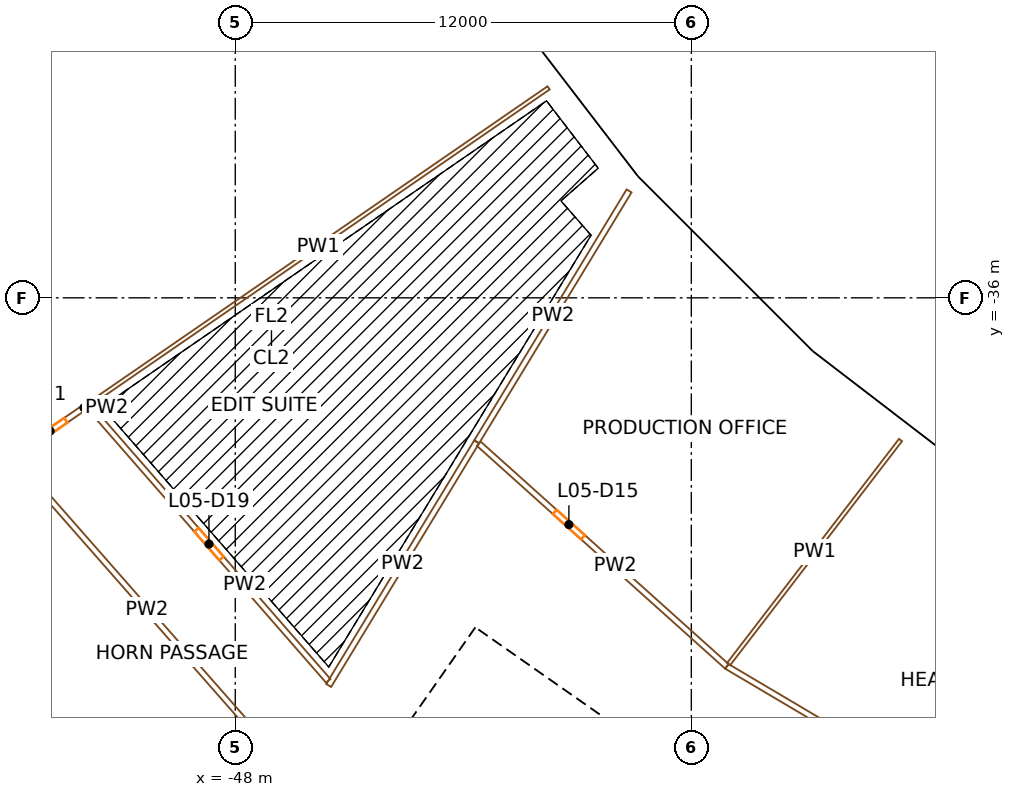
"""IFC4 building model, lengths in metres.
Left out: names, types, materials, properties, quantities, classifications, styles, units other than length and angle.
Written with IfcOpenShell. Run it as: python <this file> out.ifc"""

import sys

from ifc_helpers import new_model, si_unit, direction, frame, frame_2d, origin, origin_2d, place, context, subcontext, project, spatial, rectangle, extrude, element, fill, save


model = new_model("IFC4")
c1 = context("Model", 3, precision=1e-05, world=origin(), true_north=direction((0.0, 1.0)))
c2 = subcontext(c1, "Body", "Model", "MODEL_VIEW")
j1 = project(units=[si_unit("LENGTHUNIT", "METRE"), si_unit("PLANEANGLEUNIT", "RADIAN")], contexts=[c1])
p1 = place(None, origin())
s1 = spatial("IfcSite", under=j1, at=p1, CompositionType="ELEMENT")
p2 = place(p1, origin())
s2 = spatial("IfcBuilding", under=s1, at=p2, CompositionType="ELEMENT")
p3 = place(p2, frame((0.0, 0.0, 36.0)))
s3 = spatial("IfcBuildingStorey", under=s2, at=p3, CompositionType="ELEMENT", Elevation=36.0)
p4 = place(p3, frame((-48.433, -32.362, 0.0), z_axis=(0.0, 0.0, 1.0), x_axis=(0.55557023302, -0.831469612303, 0.0)))
e1 = element("IfcColumn", 1, at=p4, inside=s3, PredefinedType="COLUMN", context=c2, shape_type="SweptSolid", body=[
    extrude(rectangle(XDim=1.4, YDim=1.8, at=origin_2d()), origin(), (0.0, 0.0, 1.0), 4.5),
])
p5 = place(p3, frame((-38.156, -33.462, 0.0), z_axis=(0.0, 0.0, 1.0), x_axis=(0.6593458151, -0.751839807479, 0.0)))
e2 = element("IfcColumn", 2, at=p5, inside=s3, PredefinedType="COLUMN", context=c2, shape_type="SweptSolid", body=[
    extrude(rectangle(XDim=1.1, YDim=1.3, at=origin_2d()), origin(), (0.0, 0.0, 1.0), 4.5),
])
p6 = place(p3, frame((-43.795, -38.407, 0.0), z_axis=(0.0, 0.0, 1.0), x_axis=(0.6593458151, -0.751839807479, 0.0)))
e3 = element("IfcColumn", 3, at=p6, inside=s3, PredefinedType="COLUMN", context=c2, shape_type="SweptSolid", body=[
    extrude(rectangle(XDim=1.4, YDim=1.8, at=origin_2d()), origin(), (0.0, 0.0, 1.0), 4.5),
])
p7 = place(p3, frame((-33.462, -38.156, 0.0), z_axis=(0.0, 0.0, 1.0), x_axis=(0.751839807479, -0.6593458151, 0.0)))
e4 = element("IfcColumn", 4, at=p7, inside=s3, PredefinedType="COLUMN", context=c2, shape_type="SweptSolid", body=[
    extrude(rectangle(XDim=1.1, YDim=1.3, at=origin_2d()), origin(), (0.0, 0.0, 1.0), 4.5),
])
p8 = place(p3, frame((-38.407, -43.795, 0.0), z_axis=(0.0, 0.0, 1.0), x_axis=(0.751839807479, -0.6593458151, 0.0)))
e5 = element("IfcColumn", 5, at=p8, inside=s3, PredefinedType="COLUMN", context=c2, shape_type="SweptSolid", body=[
    extrude(rectangle(XDim=1.4, YDim=1.8, at=origin_2d()), origin(), (0.0, 0.0, 1.0), 4.5),
])
p9 = place(p3, frame((-49.779, -57.191, 0.0), z_axis=(0.0, 0.0, 1.0), x_axis=(0.573577477574, 0.819151315216, 0.0)))
e6 = element("IfcWall", 6, at=p9, inside=s3, PredefinedType="SHEAR", context=c2, shape_type="SweptSolid", body=[
    extrude(rectangle(XDim=14.8, YDim=0.9, at=frame_2d((7.4, 0.0))), origin(), (0.0, 0.0, 1.0), 4.2),
])
p10 = place(p9, frame((6.7, 0.0, 0.0)))
e7 = element("IfcOpeningElement", 7, at=p10, cuts=e6, PredefinedType="OPENING", context=c2, shape_type="SweptSolid", body=[
    extrude(rectangle(XDim=1.4, YDim=2.1, at=frame_2d((0.7, 1.05))), frame((0.0, 0.46, 0.0), z_axis=(0.0, -1.0, 0.0), x_axis=(1.0, 0.0, 0.0)), (0.0, 0.0, 1.0), 0.92),
])
p11 = place(p3, frame((-28.854, -54.324, 0.0), z_axis=(0.0, 0.0, 1.0), x_axis=(-0.819145767589, 0.573585400304, 0.0)))
e8 = element("IfcWall", 8, at=p11, inside=s3, PredefinedType="SHEAR", context=c2, shape_type="SweptSolid", body=[
    extrude(rectangle(XDim=15.045, YDim=0.9, at=frame_2d((7.523, 0.0))), origin(), (0.0, 0.0, 1.0), 4.2),
])
p12 = place(p11, frame((1.05, 0.0, 0.0)))
e9 = element("IfcOpeningElement", 9, at=p12, cuts=e8, PredefinedType="OPENING", context=c2, shape_type="SweptSolid", body=[
    extrude(rectangle(XDim=0.9, YDim=2.1, at=frame_2d((0.45, 1.05))), frame((0.0, 0.46, 0.0), z_axis=(0.0, -1.0, 0.0), x_axis=(1.0, 0.0, 0.0)), (0.0, 0.0, 1.0), 0.92),
])
p13 = place(p11, frame((3.775, 0.0, 0.0)))
e10 = element("IfcOpeningElement", 10, at=p13, cuts=e8, PredefinedType="OPENING", context=c2, shape_type="SweptSolid", body=[
    extrude(rectangle(XDim=1.0, YDim=2.1, at=frame_2d((0.5, 1.05))), frame((0.0, 0.46, 0.0), z_axis=(0.0, -1.0, 0.0), x_axis=(1.0, 0.0, 0.0)), (0.0, 0.0, 1.0), 0.92),
])
p14 = place(p11, frame((6.275, 0.0, 0.0)))
e11 = element("IfcOpeningElement", 11, at=p14, cuts=e8, PredefinedType="OPENING", context=c2, shape_type="SweptSolid", body=[
    extrude(rectangle(XDim=1.0, YDim=2.1, at=frame_2d((0.5, 1.05))), frame((0.0, 0.46, 0.0), z_axis=(0.0, -1.0, 0.0), x_axis=(1.0, 0.0, 0.0)), (0.0, 0.0, 1.0), 0.92),
])
p15 = place(p11, frame((13.495, 0.0, 0.0)))
e12 = element("IfcOpeningElement", 12, at=p15, cuts=e8, PredefinedType="OPENING", context=c2, shape_type="SweptSolid", body=[
    extrude(rectangle(XDim=1.1, YDim=2.1, at=frame_2d((0.55, 1.05))), frame((0.0, 0.46, 0.0), z_axis=(0.0, -1.0, 0.0), x_axis=(1.0, 0.0, 0.0)), (0.0, 0.0, 1.0), 0.92),
])
p16 = place(p3, frame((-37.555, -32.975, 0.0), z_axis=(0.0, 0.0, 1.0), x_axis=(-0.608780327927, 0.793338838284, 0.0)))
e13 = element("IfcWall", 13, at=p16, inside=s3, PredefinedType="SOLIDWALL", context=c2, shape_type="SweptSolid", body=[
    extrude(rectangle(XDim=6.597, YDim=0.45, at=frame_2d((3.298, 0.0))), origin(), (0.0, 0.0, 1.0), 3.2),
])
p17 = place(p16, frame((3.749, 0.0, 0.9)))
e14 = element("IfcOpeningElement", 14, at=p17, cuts=e13, PredefinedType="OPENING", context=c2, shape_type="SweptSolid", body=[
    extrude(rectangle(XDim=1.2, YDim=2.15, at=frame_2d((0.6, 1.075))), frame((0.0, 0.235, 0.0), z_axis=(0.0, -1.0, 0.0), x_axis=(1.0, 0.0, 0.0)), (0.0, 0.0, 1.0), 0.47),
])
p18 = place(p16, frame((1.648, 0.0, 0.9)))
e15 = element("IfcOpeningElement", 15, at=p18, cuts=e13, PredefinedType="OPENING", context=c2, shape_type="SweptSolid", body=[
    extrude(rectangle(XDim=1.2, YDim=2.15, at=frame_2d((0.6, 1.075))), frame((0.0, 0.235, 0.0), z_axis=(0.0, -1.0, 0.0), x_axis=(1.0, 0.0, 0.0)), (0.0, 0.0, 1.0), 0.47),
])
p19 = place(p3, frame((-32.993, -37.532, 0.0), z_axis=(0.0, 0.0, 1.0), x_axis=(-0.707106781187, 0.707106781187, 0.0)))
e16 = element("IfcWall", 16, at=p19, inside=s3, PredefinedType="SOLIDWALL", context=c2, shape_type="SweptSolid", body=[
    extrude(rectangle(XDim=6.419, YDim=0.45, at=frame_2d((3.209, 0.0))), origin(), (0.0, 0.0, 1.0), 3.2),
])
p20 = place(p19, frame((3.66, 0.0, 0.9)))
e17 = element("IfcOpeningElement", 17, at=p20, cuts=e16, PredefinedType="OPENING", context=c2, shape_type="SweptSolid", body=[
    extrude(rectangle(XDim=1.2, YDim=2.15, at=frame_2d((0.6, 1.075))), frame((0.0, 0.235, 0.0), z_axis=(0.0, -1.0, 0.0), x_axis=(1.0, 0.0, 0.0)), (0.0, 0.0, 1.0), 0.47),
])
p21 = place(p19, frame((1.56, 0.0, 0.9)))
e18 = element("IfcOpeningElement", 18, at=p21, cuts=e16, PredefinedType="OPENING", context=c2, shape_type="SweptSolid", body=[
    extrude(rectangle(XDim=1.2, YDim=2.15, at=frame_2d((0.6, 1.075))), frame((0.0, 0.235, 0.0), z_axis=(0.0, -1.0, 0.0), x_axis=(1.0, 0.0, 0.0)), (0.0, 0.0, 1.0), 0.47),
])
p22 = place(p3, frame((-27.741, -41.571, 0.0), z_axis=(0.0, 0.0, 1.0), x_axis=(-0.793338838284, 0.608780327927, 0.0)))
e19 = element("IfcWall", 19, at=p22, inside=s3, PredefinedType="SOLIDWALL", context=c2, shape_type="SweptSolid", body=[
    extrude(rectangle(XDim=6.597, YDim=0.45, at=frame_2d((3.298, 0.0))), origin(), (0.0, 0.0, 1.0), 3.2),
])
p23 = place(p22, frame((3.749, 0.0, 0.9)))
e20 = element("IfcOpeningElement", 20, at=p23, cuts=e19, PredefinedType="OPENING", context=c2, shape_type="SweptSolid", body=[
    extrude(rectangle(XDim=1.2, YDim=2.15, at=frame_2d((0.6, 1.075))), frame((0.0, 0.235, 0.0), z_axis=(0.0, -1.0, 0.0), x_axis=(1.0, 0.0, 0.0)), (0.0, 0.0, 1.0), 0.47),
])
p24 = place(p22, frame((1.648, 0.0, 0.9)))
e21 = element("IfcOpeningElement", 21, at=p24, cuts=e19, PredefinedType="OPENING", context=c2, shape_type="SweptSolid", body=[
    extrude(rectangle(XDim=1.2, YDim=2.15, at=frame_2d((0.6, 1.075))), frame((0.0, 0.235, 0.0), z_axis=(0.0, -1.0, 0.0), x_axis=(1.0, 0.0, 0.0)), (0.0, 0.0, 1.0), 0.47),
])
p25 = place(p3, frame((-53.86, -40.186, 0.0), z_axis=(0.0, 0.0, 1.0), x_axis=(0.823653203434, 0.567093819815, 0.0)))
e22 = element("IfcWall", 22, at=p25, inside=s3, PredefinedType="PARTITIONING", context=c2, shape_type="SweptSolid", body=[
    extrude(rectangle(XDim=2.402, YDim=0.15, at=frame_2d((1.201, 0.0))), origin(), (0.0, 0.0, 1.0), 3.1),
])
p26 = place(p25, frame((0.701, 0.0, 0.0)))
e23 = element("IfcOpeningElement", 23, at=p26, cuts=e22, PredefinedType="OPENING", context=c2, shape_type="SweptSolid", body=[
    extrude(rectangle(XDim=1.0, YDim=2.1, at=frame_2d((0.5, 1.05))), frame((0.0, 0.085, 0.0), z_axis=(0.0, -1.0, 0.0), x_axis=(1.0, 0.0, 0.0)), (0.0, 0.0, 1.0), 0.17),
])
p27 = place(p3, frame((-51.882, -38.824, 0.0), z_axis=(0.0, 0.0, 1.0), x_axis=(0.823694354942, 0.567034046276, 0.0)))
e24 = element("IfcWall", 24, at=p27, inside=s3, PredefinedType="PARTITIONING", context=c2, shape_type="SweptSolid", body=[
    extrude(rectangle(XDim=14.722, YDim=0.1, at=frame_2d((7.361, 0.0))), origin(), (0.0, 0.0, 1.0), 3.1),
])
p28 = place(p3, frame((-46.832, -48.185, 0.0), z_axis=(0.0, 0.0, 1.0), x_axis=(-0.6600545931, 0.75121763433, 0.0)))
e25 = element("IfcWall", 25, at=p28, inside=s3, PredefinedType="PARTITIONING", context=c2, shape_type="SweptSolid", body=[
    extrude(rectangle(XDim=10.573, YDim=0.15, at=frame_2d((5.287, 0.0))), origin(), (0.0, 0.0, 1.0), 3.1),
])
p29 = place(p3, frame((-51.833, -38.881, 0.0), z_axis=(0.0, 0.0, 1.0), x_axis=(0.657411055224, -0.753532152246, 0.0)))
e26 = element("IfcWall", 26, at=p29, inside=s3, PredefinedType="PARTITIONING", context=c2, shape_type="SweptSolid", body=[
    extrude(rectangle(XDim=9.553, YDim=0.15, at=frame_2d((4.776, 0.0))), origin(), (0.0, 0.0, 1.0), 3.1),
])
p30 = place(p29, frame((4.276, 0.0, 0.0)))
e27 = element("IfcOpeningElement", 27, at=p30, cuts=e26, PredefinedType="OPENING", context=c2, shape_type="SweptSolid", body=[
    extrude(rectangle(XDim=1.0, YDim=2.1, at=frame_2d((0.5, 1.05))), frame((0.0, 0.085, 0.0), z_axis=(0.0, -1.0, 0.0), x_axis=(1.0, 0.0, 0.0)), (0.0, 0.0, 1.0), 0.17),
])
p31 = place(p3, frame((-41.648, -39.789, 0.0), z_axis=(0.0, 0.0, 1.0), x_axis=(-0.519150554232, -0.854682807854, 0.0)))
e28 = element("IfcWall", 28, at=p31, inside=s3, PredefinedType="PARTITIONING", context=c2, shape_type="SweptSolid", body=[
    extrude(rectangle(XDim=7.5, YDim=0.15, at=frame_2d((3.75, 0.0))), origin(), (0.0, 0.0, 1.0), 3.1),
])
p32 = place(p3, frame((-41.592, -39.839, 0.0), z_axis=(0.0, 0.0, 1.0), x_axis=(0.744252572607, -0.667898276812, 0.0)))
e29 = element("IfcWall", 29, at=p32, inside=s3, PredefinedType="PARTITIONING", context=c2, shape_type="SweptSolid", body=[
    extrude(rectangle(XDim=8.771, YDim=0.15, at=frame_2d((4.385, 0.0))), origin(), (0.0, 0.0, 1.0), 3.1),
])
p33 = place(p32, frame((2.685, 0.0, 0.0)))
e30 = element("IfcOpeningElement", 30, at=p33, cuts=e29, PredefinedType="OPENING", context=c2, shape_type="SweptSolid", body=[
    extrude(rectangle(XDim=1.0, YDim=2.1, at=frame_2d((0.5, 1.05))), frame((0.0, 0.085, 0.0), z_axis=(0.0, -1.0, 0.0), x_axis=(1.0, 0.0, 0.0)), (0.0, 0.0, 1.0), 0.17),
])
p34 = place(p3, frame((-37.638, -33.187, 0.0), z_axis=(0.0, 0.0, 1.0), x_axis=(-0.519163683086, -0.854674833, 0.0)))
e31 = element("IfcWall", 31, at=p34, inside=s3, PredefinedType="PARTITIONING", context=c2, shape_type="SweptSolid", body=[
    extrude(rectangle(XDim=7.725, YDim=0.15, at=frame_2d((3.862, 0.0))), origin(), (0.0, 0.0, 1.0), 3.1),
])
p35 = place(p3, frame((-35.065, -45.697, 0.0), z_axis=(0.0, 0.0, 1.0), x_axis=(0.860638818745, -0.509215891022, 0.0)))
e32 = element("IfcWall", 32, at=p35, inside=s3, PredefinedType="PARTITIONING", context=c2, shape_type="SweptSolid", body=[
    extrude(rectangle(XDim=13.741, YDim=0.15, at=frame_2d((6.871, 0.0))), origin(), (0.0, 0.0, 1.0), 3.1),
])
p36 = place(p35, frame((6.37, 0.0, 0.0)))
e33 = element("IfcOpeningElement", 33, at=p36, cuts=e32, PredefinedType="OPENING", context=c2, shape_type="SweptSolid", body=[
    extrude(rectangle(XDim=1.0, YDim=2.1, at=frame_2d((0.5, 1.05))), frame((0.0, 0.085, 0.0), z_axis=(0.0, -1.0, 0.0), x_axis=(1.0, 0.0, 0.0)), (0.0, 0.0, 1.0), 0.17),
])
p37 = place(p3, frame((-30.495, -39.742, 0.0), z_axis=(0.0, 0.0, 1.0), x_axis=(-0.60877839598, -0.793340320788, 0.0)))
e34 = element("IfcWall", 34, at=p37, inside=s3, PredefinedType="PARTITIONING", context=c2, shape_type="SweptSolid", body=[
    extrude(rectangle(XDim=7.432, YDim=0.1, at=frame_2d((3.716, 0.0))), origin(), (0.0, 0.0, 1.0), 3.1),
])
p38 = place(p15, origin())
e35 = element("IfcDoor", 35, at=p38, inside=s3, OperationType="SINGLE_SWING_RIGHT", PredefinedType="DOOR", context=c2, shape_type="SweptSolid", body=[
    extrude(rectangle(XDim=1.1, YDim=2.1, at=frame_2d((0.55, 1.05))), frame((0.0, 0.025, 0.0), z_axis=(0.0, -1.0, 0.0), x_axis=(1.0, 0.0, 0.0)), (0.0, 0.0, 1.0), 0.05),
])
fill(e12, e35)
p39 = place(p17, origin())
e36 = element("IfcWindow", 36, at=p39, inside=s3, PartitioningType="SINGLE_PANEL", PredefinedType="WINDOW", context=c2, shape_type="SweptSolid", body=[
    extrude(rectangle(XDim=1.2, YDim=2.15, at=frame_2d((0.6, 1.075))), frame((0.0, 0.03, 0.0), z_axis=(0.0, -1.0, 0.0), x_axis=(1.0, 0.0, 0.0)), (0.0, 0.0, 1.0), 0.06),
])
fill(e14, e36)
p40 = place(p18, origin())
e37 = element("IfcWindow", 37, at=p40, inside=s3, PartitioningType="SINGLE_PANEL", PredefinedType="WINDOW", context=c2, shape_type="SweptSolid", body=[
    extrude(rectangle(XDim=1.2, YDim=2.15, at=frame_2d((0.6, 1.075))), frame((0.0, 0.03, 0.0), z_axis=(0.0, -1.0, 0.0), x_axis=(1.0, 0.0, 0.0)), (0.0, 0.0, 1.0), 0.06),
])
fill(e15, e37)
p41 = place(p20, origin())
e38 = element("IfcWindow", 38, at=p41, inside=s3, PartitioningType="SINGLE_PANEL", PredefinedType="WINDOW", context=c2, shape_type="SweptSolid", body=[
    extrude(rectangle(XDim=1.2, YDim=2.15, at=frame_2d((0.6, 1.075))), frame((0.0, 0.03, 0.0), z_axis=(0.0, -1.0, 0.0), x_axis=(1.0, 0.0, 0.0)), (0.0, 0.0, 1.0), 0.06),
])
fill(e17, e38)
p42 = place(p21, origin())
e39 = element("IfcWindow", 39, at=p42, inside=s3, PartitioningType="SINGLE_PANEL", PredefinedType="WINDOW", context=c2, shape_type="SweptSolid", body=[
    extrude(rectangle(XDim=1.2, YDim=2.15, at=frame_2d((0.6, 1.075))), frame((0.0, 0.03, 0.0), z_axis=(0.0, -1.0, 0.0), x_axis=(1.0, 0.0, 0.0)), (0.0, 0.0, 1.0), 0.06),
])
fill(e18, e39)
p43 = place(p23, origin())
e40 = element("IfcWindow", 40, at=p43, inside=s3, PartitioningType="SINGLE_PANEL", PredefinedType="WINDOW", context=c2, shape_type="SweptSolid", body=[
    extrude(rectangle(XDim=1.2, YDim=2.15, at=frame_2d((0.6, 1.075))), frame((0.0, 0.03, 0.0), z_axis=(0.0, -1.0, 0.0), x_axis=(1.0, 0.0, 0.0)), (0.0, 0.0, 1.0), 0.06),
])
fill(e20, e40)
p44 = place(p24, origin())
e41 = element("IfcWindow", 41, at=p44, inside=s3, PartitioningType="SINGLE_PANEL", PredefinedType="WINDOW", context=c2, shape_type="SweptSolid", body=[
    extrude(rectangle(XDim=1.2, YDim=2.15, at=frame_2d((0.6, 1.075))), frame((0.0, 0.03, 0.0), z_axis=(0.0, -1.0, 0.0), x_axis=(1.0, 0.0, 0.0)), (0.0, 0.0, 1.0), 0.06),
])
fill(e21, e41)
p45 = place(p33, origin())
e42 = element("IfcDoor", 42, at=p45, inside=s3, OperationType="SINGLE_SWING_LEFT", PredefinedType="DOOR", context=c2, shape_type="SweptSolid", body=[
    extrude(rectangle(XDim=1.0, YDim=2.1, at=frame_2d((0.5, 1.05))), frame((0.0, 0.025, 0.0), z_axis=(0.0, -1.0, 0.0), x_axis=(1.0, 0.0, 0.0)), (0.0, 0.0, 1.0), 0.05),
])
fill(e30, e42)
p46 = place(p30, origin())
e43 = element("IfcDoor", 43, at=p46, inside=s3, OperationType="SINGLE_SWING_RIGHT", PredefinedType="DOOR", context=c2, shape_type="SweptSolid", body=[
    extrude(rectangle(XDim=1.0, YDim=2.1, at=frame_2d((0.5, 1.05))), frame((0.0, 0.025, 0.0), z_axis=(0.0, -1.0, 0.0), x_axis=(1.0, 0.0, 0.0)), (0.0, 0.0, 1.0), 0.05),
])
fill(e27, e43)
p47 = place(p26, origin())
e44 = element("IfcDoor", 44, at=p47, inside=s3, OperationType="SINGLE_SWING_RIGHT", PredefinedType="DOOR", context=c2, shape_type="SweptSolid", body=[
    extrude(rectangle(XDim=1.0, YDim=2.1, at=frame_2d((0.5, 1.05))), frame((0.0, 0.025, 0.0), z_axis=(0.0, -1.0, 0.0), x_axis=(1.0, 0.0, 0.0)), (0.0, 0.0, 1.0), 0.05),
])
fill(e23, e44)
save(model, sys.argv[1])
